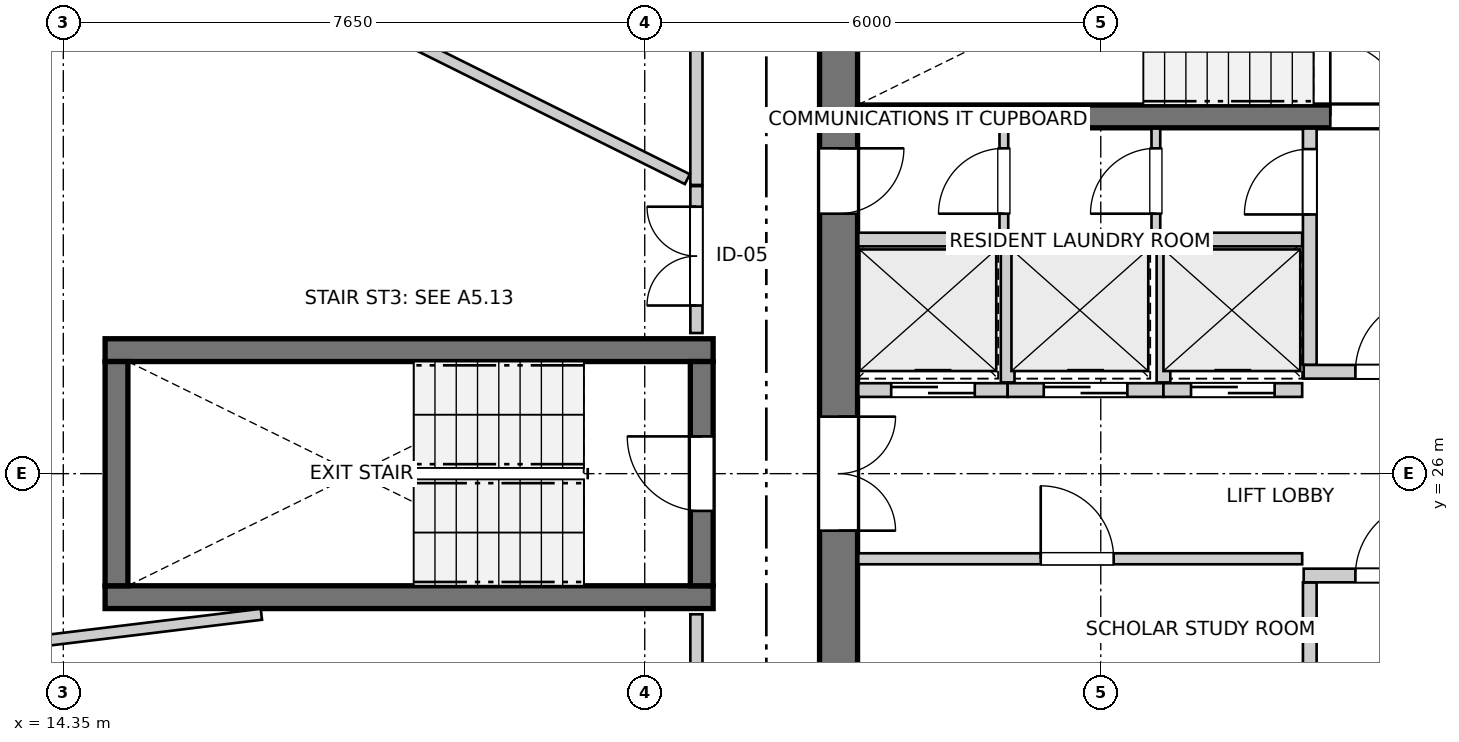
"""IFC4 building model, lengths in metres.
Left out: names, types, materials, properties, quantities, classifications, styles, units other than length and angle.
Written with IfcOpenShell. Run it as: python <this file> out.ifc"""

import sys

from ifc_helpers import new_model, si_unit, direction, frame, frame_2d, origin, place, context, subcontext, project, spatial, rectangle, extrude, source, transform, mapped, element, fill, save


model = new_model("IFC4")
c1 = context("Model", 3, precision=1e-05, world=origin(), true_north=direction((0.0, 1.0)))
c2 = subcontext(c1, "Body", "Model", "MODEL_VIEW")
j1 = project(units=[si_unit("LENGTHUNIT", "METRE"), si_unit("PLANEANGLEUNIT", "RADIAN")], contexts=[c1])
p1 = place(None, origin())
s1 = spatial("IfcSite", under=j1, at=p1, CompositionType="ELEMENT")
p2 = place(p1, origin())
s2 = spatial("IfcBuilding", under=s1, at=p2, CompositionType="ELEMENT")
p3 = place(p2, frame((0.0, 0.0, 221.2)))
s3 = spatial("IfcBuildingStorey", under=s2, at=p3, CompositionType="ELEMENT", Elevation=221.2)
p4 = place(p3, frame((24.55, 33.8, 0.0), z_axis=(0.0, 0.0, 1.0), x_axis=(0.0, -1.0, 0.0)))
e1 = element("IfcWall", 1, at=p4, inside=s3, PredefinedType="SHEAR", context=c2, shape_type="SweptSolid", body=[
    extrude(rectangle(XDim=15.6, YDim=0.5, at=frame_2d((7.8, 0.0))), origin(), (0.0, 0.0, 1.0), 2.96),
])
p5 = place(p4, frame((7.05, 0.0, 0.0)))
e2 = element("IfcOpeningElement", 2, at=p5, cuts=e1, PredefinedType="OPENING", context=c2, shape_type="SweptSolid", body=[
    extrude(rectangle(XDim=1.5, YDim=2.15, at=frame_2d((0.75, 1.075))), frame((0.0, 0.26, 0.0), z_axis=(0.0, -1.0, 0.0), x_axis=(1.0, 0.0, 0.0)), (0.0, 0.0, 1.0), 0.52),
])
p6 = place(p4, frame((3.52, 0.0, 0.0)))
e3 = element("IfcOpeningElement", 3, at=p6, cuts=e1, PredefinedType="OPENING", context=c2, shape_type="SweptSolid", body=[
    extrude(rectangle(XDim=0.86, YDim=2.05, at=frame_2d((0.43, 1.025))), frame((0.0, 0.26, 0.0), z_axis=(0.0, -1.0, 0.0), x_axis=(1.0, 0.0, 0.0)), (0.0, 0.0, 1.0), 0.52),
])
p7 = place(p4, frame((11.22, 0.0, 0.0)))
e4 = element("IfcOpeningElement", 4, at=p7, cuts=e1, PredefinedType="OPENING", context=c2, shape_type="SweptSolid", body=[
    extrude(rectangle(XDim=0.86, YDim=2.05, at=frame_2d((0.43, 1.025))), frame((0.0, 0.26, 0.0), z_axis=(0.0, -1.0, 0.0), x_axis=(1.0, 0.0, 0.0)), (0.0, 0.0, 1.0), 0.52),
])
p8 = place(p3, frame((24.8, 30.7, 0.0), z_axis=(0.0, 0.0, 1.0), x_axis=(1.0, 0.0, 0.0)))
e5 = element("IfcWall", 5, at=p8, inside=s3, PredefinedType="SHEAR", context=c2, shape_type="SweptSolid", body=[
    extrude(rectangle(XDim=11.1, YDim=0.3, at=frame_2d((5.55, 0.0))), origin(), (0.0, 0.0, 1.0), 2.96),
])
p9 = place(p8, frame((6.22, 0.0, 0.0)))
e6 = element("IfcOpeningElement", 6, at=p9, cuts=e5, PredefinedType="OPENING", context=c2, shape_type="SweptSolid", body=[
    extrude(rectangle(XDim=0.98, YDim=2.15, at=frame_2d((0.49, 1.075))), frame((0.0, 0.16, 0.0), z_axis=(0.0, -1.0, 0.0), x_axis=(1.0, 0.0, 0.0)), (0.0, 0.0, 1.0), 0.32),
])
p10 = place(p8, frame((9.15, 0.0, 0.0)))
e7 = element("IfcOpeningElement", 7, at=p10, cuts=e5, PredefinedType="OPENING", context=c2, shape_type="SweptSolid", body=[
    extrude(rectangle(XDim=1.15, YDim=2.15, at=frame_2d((0.575, 1.075))), frame((0.0, 0.16, 0.0), z_axis=(0.0, -1.0, 0.0), x_axis=(1.0, 0.0, 0.0)), (0.0, 0.0, 1.0), 0.32),
])
for number, where, z_axis, x_axis in (
    (8, (14.9, 24.375, 0.0), (0.0, 0.0, 1.0), (1.0, 0.0, 0.0)),
    (9, (22.9, 27.625, 0.0), (0.0, 0.0, 1.0), (-1.0, 0.0, 0.0)),
):
    element("IfcWall", number, at=place(p3, frame(where, z_axis=z_axis, x_axis=x_axis)), inside=s3, PredefinedType="SHEAR", context=c2, shape_type="SweptSolid", body=[
        extrude(rectangle(XDim=8.0, YDim=0.3, at=frame_2d((4.0, 0.0))), origin(), (0.0, 0.0, 1.0), 2.96),
    ])
p11 = place(p3, frame((15.05, 27.475, 0.0), z_axis=(0.0, 0.0, 1.0), x_axis=(0.0, -1.0, 0.0)))
e10 = element("IfcWall", 10, at=p11, inside=s3, PredefinedType="SHEAR", context=c2, shape_type="SweptSolid", body=[
    extrude(rectangle(XDim=2.95, YDim=0.3, at=frame_2d((1.475, 0.0))), origin(), (0.0, 0.0, 1.0), 2.96),
])
p12 = place(p3, frame((22.75, 24.525, 0.0), z_axis=(0.0, 0.0, 1.0), x_axis=(0.0, 1.0, 0.0)))
e11 = element("IfcWall", 11, at=p12, inside=s3, PredefinedType="SHEAR", context=c2, shape_type="SweptSolid", body=[
    extrude(rectangle(XDim=2.95, YDim=0.3, at=frame_2d((1.475, 0.0))), origin(), (0.0, 0.0, 1.0), 2.96),
])
p13 = place(p12, frame((0.985, 0.0, 0.0)))
e12 = element("IfcOpeningElement", 12, at=p13, cuts=e11, PredefinedType="OPENING", context=c2, shape_type="SweptSolid", body=[
    extrude(rectangle(XDim=0.98, YDim=2.15, at=frame_2d((0.49, 1.075))), frame((0.0, 0.16, 0.0), z_axis=(0.0, -1.0, 0.0), x_axis=(1.0, 0.0, 0.0)), (0.0, 0.0, 1.0), 0.32),
])
p14 = place(p3, frame((30.75, 21.46, 0.0), z_axis=(0.0, 0.0, 1.0), x_axis=(0.0, 1.0, 0.0)))
e13 = element("IfcWall", 13, at=p14, inside=s3, PredefinedType="PARTITIONING", context=c2, shape_type="SweptSolid", body=[
    extrude(rectangle(XDim=3.11, YDim=0.18, at=frame_2d((1.555, 0.0))), origin(), (0.0, 0.0, 1.0), 2.96),
])
p15 = place(p14, frame((0.26, 0.0, 0.0)))
e14 = element("IfcOpeningElement", 14, at=p15, cuts=e13, PredefinedType="OPENING", context=c2, shape_type="SweptSolid", body=[
    extrude(rectangle(XDim=0.86, YDim=2.05, at=frame_2d((0.43, 1.025))), frame((0.0, 0.1, 0.0), z_axis=(0.0, -1.0, 0.0), x_axis=(1.0, 0.0, 0.0)), (0.0, 0.0, 1.0), 0.2),
])
p16 = place(p3, frame((30.67, 24.66, 0.0), z_axis=(0.0, 0.0, 1.0), x_axis=(1.0, 0.0, 0.0)))
e15 = element("IfcWall", 15, at=p16, inside=s3, PredefinedType="PARTITIONING", context=c2, shape_type="SweptSolid", body=[
    extrude(rectangle(XDim=5.22, YDim=0.18, at=frame_2d((2.61, 0.0))), origin(), (0.0, 0.0, 1.0), 2.96),
])
p17 = place(p16, frame((0.68, 0.0, 0.0)))
e16 = element("IfcOpeningElement", 16, at=p17, cuts=e15, PredefinedType="OPENING", context=c2, shape_type="SweptSolid", body=[
    extrude(rectangle(XDim=0.98, YDim=2.15, at=frame_2d((0.49, 1.075))), frame((0.0, 0.1, 0.0), z_axis=(0.0, -1.0, 0.0), x_axis=(1.0, 0.0, 0.0)), (0.0, 0.0, 1.0), 0.2),
])
p18 = place(p3, frame((30.75, 27.43, 0.0), z_axis=(0.0, 0.0, 1.0), x_axis=(0.0, 1.0, 0.0)))
e17 = element("IfcWall", 17, at=p18, inside=s3, PredefinedType="PARTITIONING", context=c2, shape_type="SweptSolid", body=[
    extrude(rectangle(XDim=3.11, YDim=0.18, at=frame_2d((1.555, 0.0))), origin(), (0.0, 0.0, 1.0), 2.96),
])
p19 = place(p18, frame((1.98, 0.0, 0.0)))
e18 = element("IfcOpeningElement", 18, at=p19, cuts=e17, PredefinedType="OPENING", context=c2, shape_type="SweptSolid", body=[
    extrude(rectangle(XDim=0.86, YDim=2.05, at=frame_2d((0.43, 1.025))), frame((0.0, 0.1, 0.0), z_axis=(0.0, -1.0, 0.0), x_axis=(1.0, 0.0, 0.0)), (0.0, 0.0, 1.0), 0.2),
])
p20 = place(p3, frame((30.67, 27.34, 0.0), z_axis=(0.0, 0.0, 1.0), x_axis=(1.0, 0.0, 0.0)))
e19 = element("IfcWall", 19, at=p20, inside=s3, PredefinedType="PARTITIONING", context=c2, shape_type="SweptSolid", body=[
    extrude(rectangle(XDim=5.22, YDim=0.18, at=frame_2d((2.61, 0.0))), origin(), (0.0, 0.0, 1.0), 2.96),
])
p21 = place(p20, frame((0.68, 0.0, 0.0)))
e20 = element("IfcOpeningElement", 20, at=p21, cuts=e19, PredefinedType="OPENING", context=c2, shape_type="SweptSolid", body=[
    extrude(rectangle(XDim=0.98, YDim=2.15, at=frame_2d((0.49, 1.075))), frame((0.0, 0.1, 0.0), z_axis=(0.0, -1.0, 0.0), x_axis=(1.0, 0.0, 0.0)), (0.0, 0.0, 1.0), 0.2),
])
p22 = place(p3, frame((24.81, 24.88, 0.0), z_axis=(0.0, 0.0, 1.0), x_axis=(1.0, 0.0, 0.0)))
e21 = element("IfcWall", 21, at=p22, inside=s3, PredefinedType="PARTITIONING", context=c2, shape_type="SweptSolid", body=[
    extrude(rectangle(XDim=5.84, YDim=0.145, at=frame_2d((2.92, 0.0))), origin(), (0.0, 0.0, 1.0), 2.96),
])
p23 = place(p22, frame((2.4, 0.0, 0.0)))
e22 = element("IfcOpeningElement", 22, at=p23, cuts=e21, PredefinedType="OPENING", context=c2, shape_type="SweptSolid", body=[
    extrude(rectangle(XDim=0.96, YDim=2.1, at=frame_2d((0.48, 1.05))), frame((0.0, 0.083, 0.0), z_axis=(0.0, -1.0, 0.0), x_axis=(1.0, 0.0, 0.0)), (0.0, 0.0, 1.0), 0.165),
])
p24 = place(p3, frame((24.81, 29.08, 0.0), z_axis=(0.0, 0.0, 1.0), x_axis=(1.0, 0.0, 0.0)))
e23 = element("IfcWall", 23, at=p24, inside=s3, PredefinedType="PARTITIONING", context=c2, shape_type="SweptSolid", body=[
    extrude(rectangle(XDim=5.84, YDim=0.18, at=frame_2d((2.92, 0.0))), origin(), (0.0, 0.0, 1.0), 2.96),
])
p25 = place(p3, frame((24.81, 27.1, 0.0), z_axis=(0.0, 0.0, 1.0), x_axis=(1.0, 0.0, 0.0)))
e24 = element("IfcWall", 24, at=p25, inside=s3, PredefinedType="PARTITIONING", context=c2, shape_type="SweptSolid", body=[
    extrude(rectangle(XDim=1.965, YDim=0.18, at=frame_2d((0.982, 0.0))), origin(), (0.0, 0.0, 1.0), 2.96),
])
p26 = place(p25, frame((0.433, 0.0, 0.0)))
e25 = element("IfcOpeningElement", 25, at=p26, cuts=e24, PredefinedType="OPENING", context=c2, shape_type="SweptSolid", body=[
    extrude(rectangle(XDim=1.1, YDim=2.15, at=frame_2d((0.55, 1.075))), frame((0.0, 0.1, 0.0), z_axis=(0.0, -1.0, 0.0), x_axis=(1.0, 0.0, 0.0)), (0.0, 0.0, 1.0), 0.2),
])
p27 = place(p3, frame((26.775, 27.1, 0.0), z_axis=(0.0, 0.0, 1.0), x_axis=(1.0, 0.0, 0.0)))
e26 = element("IfcWall", 26, at=p27, inside=s3, PredefinedType="PARTITIONING", context=c2, shape_type="SweptSolid", body=[
    extrude(rectangle(XDim=2.05, YDim=0.18, at=frame_2d((1.025, 0.0))), origin(), (0.0, 0.0, 1.0), 2.96),
])
p28 = place(p27, frame((0.475, 0.0, 0.0)))
e27 = element("IfcOpeningElement", 27, at=p28, cuts=e26, PredefinedType="OPENING", context=c2, shape_type="SweptSolid", body=[
    extrude(rectangle(XDim=1.1, YDim=2.15, at=frame_2d((0.55, 1.075))), frame((0.0, 0.1, 0.0), z_axis=(0.0, -1.0, 0.0), x_axis=(1.0, 0.0, 0.0)), (0.0, 0.0, 1.0), 0.2),
])
p29 = place(p3, frame((26.775, 27.2, 0.0), z_axis=(0.0, 0.0, 1.0), x_axis=(0.0, 1.0, 0.0)))
e28 = element("IfcWall", 28, at=p29, inside=s3, PredefinedType="PARTITIONING", context=c2, shape_type="SweptSolid", body=[
    extrude(rectangle(XDim=1.78, YDim=0.18, at=frame_2d((0.89, 0.0))), origin(), (0.0, 0.0, 1.0), 2.96),
])
p30 = place(p3, frame((28.825, 27.1, 0.0), z_axis=(0.0, 0.0, 1.0), x_axis=(1.0, 0.0, 0.0)))
e29 = element("IfcWall", 29, at=p30, inside=s3, PredefinedType="PARTITIONING", context=c2, shape_type="SweptSolid", body=[
    extrude(rectangle(XDim=1.825, YDim=0.18, at=frame_2d((0.913, 0.0))), origin(), (0.0, 0.0, 1.0), 2.96),
])
p31 = place(p30, frame((0.363, 0.0, 0.0)))
e30 = element("IfcOpeningElement", 30, at=p31, cuts=e29, PredefinedType="OPENING", context=c2, shape_type="SweptSolid", body=[
    extrude(rectangle(XDim=1.1, YDim=2.15, at=frame_2d((0.55, 1.075))), frame((0.0, 0.1, 0.0), z_axis=(0.0, -1.0, 0.0), x_axis=(1.0, 0.0, 0.0)), (0.0, 0.0, 1.0), 0.2),
])
p32 = place(p3, frame((28.825, 27.2, 0.0), z_axis=(0.0, 0.0, 1.0), x_axis=(0.0, 1.0, 0.0)))
e31 = element("IfcWall", 31, at=p32, inside=s3, PredefinedType="PARTITIONING", context=c2, shape_type="SweptSolid", body=[
    extrude(rectangle(XDim=1.78, YDim=0.18, at=frame_2d((0.89, 0.0))), origin(), (0.0, 0.0, 1.0), 2.96),
])
p33 = place(p3, frame((26.725, 29.16, 0.0), z_axis=(0.0, 0.0, 1.0), x_axis=(0.0, 1.0, 0.0)))
e32 = element("IfcWall", 32, at=p33, inside=s3, PredefinedType="PARTITIONING", context=c2, shape_type="SweptSolid", body=[
    extrude(rectangle(XDim=1.38, YDim=0.115, at=frame_2d((0.69, 0.0))), origin(), (0.0, 0.0, 1.0), 2.96),
])
p34 = place(p33, frame((0.26, 0.0, 0.0)))
e33 = element("IfcOpeningElement", 33, at=p34, cuts=e32, PredefinedType="OPENING", context=c2, shape_type="SweptSolid", body=[
    extrude(rectangle(XDim=0.86, YDim=2.05, at=frame_2d((0.43, 1.025))), frame((0.0, 0.067, 0.0), z_axis=(0.0, -1.0, 0.0), x_axis=(1.0, 0.0, 0.0)), (0.0, 0.0, 1.0), 0.135),
])
p35 = place(p3, frame((28.725, 29.16, 0.0), z_axis=(0.0, 0.0, 1.0), x_axis=(0.0, 1.0, 0.0)))
e34 = element("IfcWall", 34, at=p35, inside=s3, PredefinedType="PARTITIONING", context=c2, shape_type="SweptSolid", body=[
    extrude(rectangle(XDim=1.38, YDim=0.115, at=frame_2d((0.69, 0.0))), origin(), (0.0, 0.0, 1.0), 2.96),
])
p36 = place(p35, frame((0.26, 0.0, 0.0)))
e35 = element("IfcOpeningElement", 35, at=p36, cuts=e34, PredefinedType="OPENING", context=c2, shape_type="SweptSolid", body=[
    extrude(rectangle(XDim=0.86, YDim=2.05, at=frame_2d((0.43, 1.025))), frame((0.0, 0.067, 0.0), z_axis=(0.0, -1.0, 0.0), x_axis=(1.0, 0.0, 0.0)), (0.0, 0.0, 1.0), 0.135),
])
p37 = place(p3, frame((22.68, 29.798, 0.0), z_axis=(0.0, 0.0, 1.0), x_axis=(0.0, 1.0, 0.0)))
e36 = element("IfcWall", 36, at=p37, inside=s3, PredefinedType="PARTITIONING", context=c2, shape_type="SweptSolid", body=[
    extrude(rectangle(XDim=4.502, YDim=0.16, at=frame_2d((2.251, 0.0))), origin(), (0.0, 0.0, 1.0), 2.96),
])
p38 = place(p3, frame((22.68, 21.241, 0.0), z_axis=(0.0, 0.0, 1.0), x_axis=(0.0, 1.0, 0.0)))
e37 = element("IfcWall", 37, at=p38, inside=s3, PredefinedType="PARTITIONING", context=c2, shape_type="SweptSolid", body=[
    extrude(rectangle(XDim=2.909, YDim=0.16, at=frame_2d((1.455, 0.0))), origin(), (0.0, 0.0, 1.0), 2.96),
])
p39 = place(p38, frame((0.826, 0.0, 0.0)))
e38 = element("IfcOpeningElement", 38, at=p39, cuts=e37, PredefinedType="OPENING", context=c2, shape_type="SweptSolid", body=[
    extrude(rectangle(XDim=1.3, YDim=2.1, at=frame_2d((0.65, 1.05))), frame((0.0, 0.09, 0.0), z_axis=(0.0, -1.0, 0.0), x_axis=(1.0, 0.0, 0.0)), (0.0, 0.0, 1.0), 0.18),
])
p40 = place(p3, frame((22.68, 27.85, 0.0), z_axis=(0.0, 0.0, 1.0), x_axis=(0.0, 1.0, 0.0)))
e39 = element("IfcWall", 39, at=p40, inside=s3, PredefinedType="PARTITIONING", context=c2, shape_type="SweptSolid", body=[
    extrude(rectangle(XDim=1.933, YDim=0.16, at=frame_2d((0.966, 0.0))), origin(), (0.0, 0.0, 1.0), 2.96),
])
p41 = place(p40, frame((0.362, 0.0, 0.0)))
e40 = element("IfcOpeningElement", 40, at=p41, cuts=e39, PredefinedType="OPENING", context=c2, shape_type="SweptSolid", body=[
    extrude(rectangle(XDim=1.3, YDim=2.1, at=frame_2d((0.65, 1.05))), frame((0.0, 0.09, 0.0), z_axis=(0.0, -1.0, 0.0), x_axis=(1.0, 0.0, 0.0)), (0.0, 0.0, 1.0), 0.18),
])
p42 = place(p3, frame((14.802, 33.734, 0.0), z_axis=(0.0, 0.0, 1.0), x_axis=(0.895354955696, -0.445353234311, 0.0)))
e41 = element("IfcWall", 41, at=p42, inside=s3, PredefinedType="PARTITIONING", context=c2, shape_type="SweptSolid", body=[
    extrude(rectangle(XDim=8.666, YDim=0.145, at=frame_2d((4.333, 0.0))), origin(), (0.0, 0.0, 1.0), 2.96),
])
p43 = place(p42, frame((0.35, 0.0, 0.0)))
e42 = element("IfcOpeningElement", 42, at=p43, cuts=e41, PredefinedType="OPENING", context=c2, shape_type="SweptSolid", body=[
    extrude(rectangle(XDim=0.96, YDim=2.1, at=frame_2d((0.48, 1.05))), frame((0.0, 0.083, 0.0), z_axis=(0.0, -1.0, 0.0), x_axis=(1.0, 0.0, 0.0)), (0.0, 0.0, 1.0), 0.165),
])
p44 = place(p3, frame((10.087, 23.315, 0.0), z_axis=(0.0, 0.0, 1.0), x_axis=(0.992692853732, 0.120668546642, 0.0)))
e43 = element("IfcWall", 43, at=p44, inside=s3, PredefinedType="PARTITIONING", context=c2, shape_type="SweptSolid", body=[
    extrude(rectangle(XDim=6.919, YDim=0.145, at=frame_2d((3.46, 0.0))), origin(), (0.0, 0.0, 1.0), 2.96),
])
m1 = source(origin(), c2, "Body", "SweptSolid", [
    extrude(rectangle(XDim=0.98, YDim=2.15, at=frame_2d((0.49, 1.075))), frame((0.0, 0.025, 0.0), z_axis=(0.0, -1.0, 0.0), x_axis=(1.0, 0.0, 0.0)), (0.0, 0.0, 1.0), 0.05),
])
p45 = place(p9, origin())
e44 = element("IfcDoor", 44, at=p45, inside=s3, OperationType="SINGLE_SWING_LEFT", PredefinedType="DOOR", context=c2, shape_type="MappedRepresentation", body=[
    mapped(m1, transform((0.0, 0.0, 0.0), x_axis=(1.0, 0.0, 0.0), y_axis=(0.0, 1.0, 0.0), z_axis=(0.0, 0.0, 1.0), scale=1.0)),
])
fill(e6, e44)
p46 = place(p13, origin())
e45 = element("IfcDoor", 45, at=p46, inside=s3, OperationType="SINGLE_SWING_RIGHT", PredefinedType="DOOR", context=c2, shape_type="MappedRepresentation", body=[
    mapped(m1, transform((0.0, 0.0, 0.0), x_axis=(1.0, 0.0, 0.0), y_axis=(0.0, 1.0, 0.0), z_axis=(0.0, 0.0, 1.0), scale=1.0)),
])
fill(e12, e45)
m2 = source(origin(), c2, "Body", "SweptSolid", [
    extrude(rectangle(XDim=1.5, YDim=2.15, at=frame_2d((0.75, 1.075))), frame((0.0, 0.025, 0.0), z_axis=(0.0, -1.0, 0.0), x_axis=(1.0, 0.0, 0.0)), (0.0, 0.0, 1.0), 0.05),
])
p47 = place(p5, origin())
e46 = element("IfcDoor", 46, at=p47, inside=s3, OperationType="DOUBLE_DOOR_SINGLE_SWING", PredefinedType="DOOR", context=c2, shape_type="MappedRepresentation", body=[
    mapped(m2, transform((0.0, 0.0, 0.0), x_axis=(1.0, 0.0, 0.0), y_axis=(0.0, 1.0, 0.0), z_axis=(0.0, 0.0, 1.0), scale=1.0)),
])
fill(e2, e46)
m3 = source(origin(), c2, "Body", "SweptSolid", [
    extrude(rectangle(XDim=0.86, YDim=2.05, at=frame_2d((0.43, 1.025))), frame((0.0, 0.025, 0.0), z_axis=(0.0, -1.0, 0.0), x_axis=(1.0, 0.0, 0.0)), (0.0, 0.0, 1.0), 0.05),
])
p48 = place(p6, origin())
e47 = element("IfcDoor", 47, at=p48, inside=s3, OperationType="SINGLE_SWING_LEFT", PredefinedType="DOOR", context=c2, shape_type="MappedRepresentation", body=[
    mapped(m3, transform((0.0, 0.0, 0.0), x_axis=(1.0, 0.0, 0.0), y_axis=(0.0, 1.0, 0.0), z_axis=(0.0, 0.0, 1.0), scale=1.0)),
])
fill(e3, e47)
p49 = place(p17, origin())
e48 = element("IfcDoor", 48, at=p49, inside=s3, OperationType="SINGLE_SWING_RIGHT", PredefinedType="DOOR", context=c2, shape_type="MappedRepresentation", body=[
    mapped(m1, transform((0.0, 0.0, 0.0), x_axis=(1.0, 0.0, 0.0), y_axis=(0.0, 1.0, 0.0), z_axis=(0.0, 0.0, 1.0), scale=1.0)),
])
fill(e16, e48)
p50 = place(p19, origin())
e49 = element("IfcDoor", 49, at=p50, inside=s3, OperationType="SINGLE_SWING_LEFT", PredefinedType="DOOR", context=c2, shape_type="MappedRepresentation", body=[
    mapped(m3, transform((0.0, 0.0, 0.0), x_axis=(1.0, 0.0, 0.0), y_axis=(0.0, 1.0, 0.0), z_axis=(0.0, 0.0, 1.0), scale=1.0)),
])
fill(e18, e49)
p51 = place(p21, origin())
e50 = element("IfcDoor", 50, at=p51, inside=s3, OperationType="SINGLE_SWING_RIGHT", PredefinedType="DOOR", context=c2, shape_type="MappedRepresentation", body=[
    mapped(m1, transform((0.0, 0.0, 0.0), x_axis=(1.0, 0.0, 0.0), y_axis=(0.0, 1.0, 0.0), z_axis=(0.0, 0.0, 1.0), scale=1.0)),
])
fill(e20, e50)
m4 = source(origin(), c2, "Body", "SweptSolid", [
    extrude(rectangle(XDim=0.96, YDim=2.1, at=frame_2d((0.48, 1.05))), frame((0.0, 0.025, 0.0), z_axis=(0.0, -1.0, 0.0), x_axis=(1.0, 0.0, 0.0)), (0.0, 0.0, 1.0), 0.05),
])
p52 = place(p23, origin())
e51 = element("IfcDoor", 51, at=p52, inside=s3, OperationType="SINGLE_SWING_LEFT", PredefinedType="DOOR", context=c2, shape_type="MappedRepresentation", body=[
    mapped(m4, transform((0.0, 0.0, 0.0), x_axis=(1.0, 0.0, 0.0), y_axis=(0.0, 1.0, 0.0), z_axis=(0.0, 0.0, 1.0), scale=1.0)),
])
fill(e22, e51)
m5 = source(origin(), c2, "Body", "SweptSolid", [
    extrude(rectangle(XDim=1.1, YDim=2.15, at=frame_2d((0.55, 1.075))), frame((0.0, 0.025, 0.0), z_axis=(0.0, -1.0, 0.0), x_axis=(1.0, 0.0, 0.0)), (0.0, 0.0, 1.0), 0.05),
])
p53 = place(p26, origin())
e52 = element("IfcDoor", 52, at=p53, inside=s3, OperationType="DOUBLE_DOOR_SLIDING", PredefinedType="DOOR", context=c2, shape_type="MappedRepresentation", body=[
    mapped(m5, transform((0.0, 0.0, 0.0), x_axis=(1.0, 0.0, 0.0), y_axis=(0.0, 1.0, 0.0), z_axis=(0.0, 0.0, 1.0), scale=1.0)),
])
fill(e25, e52)
p54 = place(p28, origin())
e53 = element("IfcDoor", 53, at=p54, inside=s3, OperationType="DOUBLE_DOOR_SLIDING", PredefinedType="DOOR", context=c2, shape_type="MappedRepresentation", body=[
    mapped(m5, transform((0.0, 0.0, 0.0), x_axis=(1.0, 0.0, 0.0), y_axis=(0.0, 1.0, 0.0), z_axis=(0.0, 0.0, 1.0), scale=1.0)),
])
fill(e27, e53)
p55 = place(p31, origin())
e54 = element("IfcDoor", 54, at=p55, inside=s3, OperationType="DOUBLE_DOOR_SLIDING", PredefinedType="DOOR", context=c2, shape_type="MappedRepresentation", body=[
    mapped(m5, transform((0.0, 0.0, 0.0), x_axis=(1.0, 0.0, 0.0), y_axis=(0.0, 1.0, 0.0), z_axis=(0.0, 0.0, 1.0), scale=1.0)),
])
fill(e30, e54)
p56 = place(p34, origin())
e55 = element("IfcDoor", 55, at=p56, inside=s3, OperationType="SINGLE_SWING_LEFT", PredefinedType="DOOR", context=c2, shape_type="MappedRepresentation", body=[
    mapped(m3, transform((0.0, 0.0, 0.0), x_axis=(1.0, 0.0, 0.0), y_axis=(0.0, 1.0, 0.0), z_axis=(0.0, 0.0, 1.0), scale=1.0)),
])
fill(e33, e55)
p57 = place(p36, origin())
e56 = element("IfcDoor", 56, at=p57, inside=s3, OperationType="SINGLE_SWING_LEFT", PredefinedType="DOOR", context=c2, shape_type="MappedRepresentation", body=[
    mapped(m3, transform((0.0, 0.0, 0.0), x_axis=(1.0, 0.0, 0.0), y_axis=(0.0, 1.0, 0.0), z_axis=(0.0, 0.0, 1.0), scale=1.0)),
])
fill(e35, e56)
m6 = source(origin(), c2, "Body", "SweptSolid", [
    extrude(rectangle(XDim=1.3, YDim=2.1, at=frame_2d((0.65, 1.05))), frame((0.0, 0.025, 0.0), z_axis=(0.0, -1.0, 0.0), x_axis=(1.0, 0.0, 0.0)), (0.0, 0.0, 1.0), 0.05),
])
p58 = place(p41, origin())
e57 = element("IfcDoor", 57, at=p58, inside=s3, OperationType="DOUBLE_DOOR_SINGLE_SWING", PredefinedType="DOOR", context=c2, shape_type="MappedRepresentation", body=[
    mapped(m6, transform((0.0, 0.0, 0.0), x_axis=(1.0, 0.0, 0.0), y_axis=(0.0, 1.0, 0.0), z_axis=(0.0, 0.0, 1.0), scale=1.0)),
])
fill(e40, e57)
save(model, sys.argv[1])
